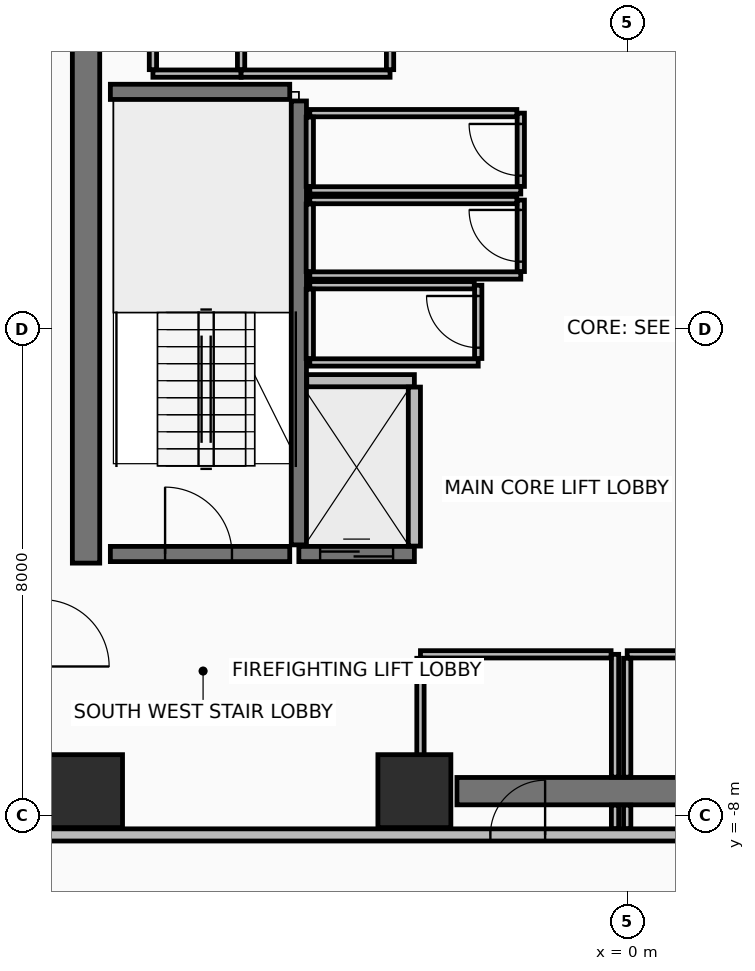
"""IFC4 building model, lengths in metres.
Left out: names, types, materials, properties, quantities, classifications, styles, units other than length and angle.
Written with IfcOpenShell. Run it as: python <this file> out.ifc"""

import sys

from ifc_helpers import new_model, si_unit, direction, frame, frame_2d, origin, origin_2d, place, context, subcontext, project, spatial, rectangle, extrude, element, fill, save


model = new_model("IFC4")
c1 = context("Model", 3, precision=1e-05, world=origin(), true_north=direction((0.0, 1.0)))
c2 = subcontext(c1, "Body", "Model", "MODEL_VIEW")
j1 = project(units=[si_unit("LENGTHUNIT", "METRE"), si_unit("PLANEANGLEUNIT", "RADIAN")], contexts=[c1])
p1 = place(None, origin())
s1 = spatial("IfcSite", under=j1, at=p1, CompositionType="ELEMENT")
p2 = place(p1, origin())
s2 = spatial("IfcBuilding", under=s1, at=p2, CompositionType="ELEMENT")
p3 = place(p2, frame((0.0, 0.0, 218.45)))
s3 = spatial("IfcBuildingStorey", under=s2, at=p3, CompositionType="ELEMENT", Elevation=218.45)
for number, where, z_axis, x_axis in (
    (1, (-8.9, -7.6, 0.0), (0.0, 0.0, 1.0), (1.0, 0.0, 0.0)),
    (2, (-3.5, -7.6, 0.0), (0.0, 0.0, 1.0), (1.0, 0.0, 0.0)),
):
    element("IfcColumn", number, at=place(p3, frame(where, z_axis=z_axis, x_axis=x_axis)), inside=s3, PredefinedType="COLUMN", context=c2, shape_type="SweptSolid", body=[
        extrude(rectangle(XDim=1.2, YDim=1.2, at=origin_2d()), origin(), (0.0, 0.0, 1.0), 3.6),
    ])
p4 = place(p3, frame((-2.8, -7.6, 0.0), z_axis=(0.0, 0.0, 1.0), x_axis=(1.0, 0.0, 0.0)))
e3 = element("IfcWall", 3, at=p4, inside=s3, PredefinedType="SHEAR", context=c2, shape_type="SweptSolid", body=[
    extrude(rectangle(XDim=5.38, YDim=0.45, at=frame_2d((2.69, 0.0))), origin(), (0.0, 0.0, 1.0), 3.36),
])
p5 = place(p3, frame((-8.9, -3.85, 0.0), z_axis=(0.0, 0.0, 1.0), x_axis=(0.0, 1.0, 0.0)))
e4 = element("IfcWall", 4, at=p5, inside=s3, PredefinedType="SHEAR", context=c2, shape_type="SweptSolid", body=[
    extrude(rectangle(XDim=10.7, YDim=0.45, at=frame_2d((5.35, 0.0))), origin(), (0.0, 0.0, 1.0), 3.36),
])
p6 = place(p3, frame((-9.62, -8.32, 0.0), z_axis=(0.0, 0.0, 1.0), x_axis=(1.0, 0.0, 0.0)))
e5 = element("IfcWall", 5, at=p6, inside=s3, PredefinedType="PARTITIONING", context=c2, shape_type="SweptSolid", body=[
    extrude(rectangle(XDim=19.24, YDim=0.2, at=frame_2d((9.62, 0.0))), origin(), (0.0, 0.0, 1.0), 2.805),
])
p7 = place(p6, frame((7.37, 0.0, 0.0)))
e6 = element("IfcOpeningElement", 6, at=p7, cuts=e5, PredefinedType="OPENING", context=c2, shape_type="SweptSolid", body=[
    extrude(rectangle(XDim=0.9, YDim=2.1, at=frame_2d((0.45, 1.05))), frame((0.0, 0.11, 0.0), z_axis=(0.0, -1.0, 0.0), x_axis=(1.0, 0.0, 0.0)), (0.0, 0.0, 1.0), 0.22),
])
p8 = place(p6, frame((10.77, 0.0, 0.0)))
e7 = element("IfcOpeningElement", 7, at=p8, cuts=e5, PredefinedType="OPENING", context=c2, shape_type="SweptSolid", body=[
    extrude(rectangle(XDim=0.9, YDim=2.1, at=frame_2d((0.45, 1.05))), frame((0.0, 0.11, 0.0), z_axis=(0.0, -1.0, 0.0), x_axis=(1.0, 0.0, 0.0)), (0.0, 0.0, 1.0), 0.22),
])
p9 = place(p6, frame((13.97, 0.0, 0.0)))
e8 = element("IfcOpeningElement", 8, at=p9, cuts=e5, PredefinedType="OPENING", context=c2, shape_type="SweptSolid", body=[
    extrude(rectangle(XDim=0.9, YDim=2.1, at=frame_2d((0.45, 1.05))), frame((0.0, 0.11, 0.0), z_axis=(0.0, -1.0, 0.0), x_axis=(1.0, 0.0, 0.0)), (0.0, 0.0, 1.0), 0.22),
])
p10 = place(p3, frame((-5.4, -3.55, 0.0), z_axis=(0.0, 0.0, 1.0), x_axis=(0.0, 1.0, 0.0)))
e9 = element("IfcWall", 9, at=p10, inside=s3, PredefinedType="SHEAR", context=c2, shape_type="SweptSolid", body=[
    extrude(rectangle(XDim=7.3, YDim=0.25, at=frame_2d((3.65, 0.0))), origin(), (0.0, 0.0, 1.0), 3.36),
])
p11 = place(p3, frame((-8.5, -3.7, 0.0), z_axis=(0.0, 0.0, 1.0), x_axis=(1.0, 0.0, 0.0)))
e10 = element("IfcWall", 10, at=p11, inside=s3, PredefinedType="SHEAR", context=c2, shape_type="SweptSolid", body=[
    extrude(rectangle(XDim=2.95, YDim=0.25, at=frame_2d((1.475, 0.0))), origin(), (0.0, 0.0, 1.0), 3.36),
])
p12 = place(p11, frame((0.9, 0.0, 0.0)))
e11 = element("IfcOpeningElement", 11, at=p12, cuts=e10, PredefinedType="OPENING", context=c2, shape_type="SweptSolid", body=[
    extrude(rectangle(XDim=1.1, YDim=2.15, at=frame_2d((0.55, 1.075))), frame((0.0, 0.135, 0.0), z_axis=(0.0, -1.0, 0.0), x_axis=(1.0, 0.0, 0.0)), (0.0, 0.0, 1.0), 0.27),
])
p13 = place(p3, frame((-8.5, 3.9, 0.0), z_axis=(0.0, 0.0, 1.0), x_axis=(1.0, 0.0, 0.0)))
e12 = element("IfcWall", 12, at=p13, inside=s3, PredefinedType="SHEAR", context=c2, shape_type="SweptSolid", body=[
    extrude(rectangle(XDim=2.95, YDim=0.25, at=frame_2d((1.475, 0.0))), origin(), (0.0, 0.0, 1.0), 3.36),
])
p14 = place(p3, frame((-5.4, -3.7, 0.0), z_axis=(0.0, 0.0, 1.0), x_axis=(1.0, 0.0, 0.0)))
e13 = element("IfcWall", 13, at=p14, inside=s3, PredefinedType="SHEAR", context=c2, shape_type="SweptSolid", body=[
    extrude(rectangle(XDim=1.9, YDim=0.25, at=frame_2d((0.95, 0.0))), origin(), (0.0, 0.0, 1.0), 3.36),
])
p15 = place(p14, frame((0.35, 0.0, 0.0)))
e14 = element("IfcOpeningElement", 14, at=p15, cuts=e13, PredefinedType="OPENING", context=c2, shape_type="SweptSolid", body=[
    extrude(rectangle(XDim=1.2, YDim=2.2, at=frame_2d((0.6, 1.1))), frame((0.0, 0.135, 0.0), z_axis=(0.0, -1.0, 0.0), x_axis=(1.0, 0.0, 0.0)), (0.0, 0.0, 1.0), 0.27),
])
p16 = place(p3, frame((-5.27, -0.85, 0.0), z_axis=(0.0, 0.0, 1.0), x_axis=(1.0, 0.0, 0.0)))
e15 = element("IfcWall", 15, at=p16, inside=s3, PredefinedType="PARTITIONING", context=c2, shape_type="SweptSolid", body=[
    extrude(rectangle(XDim=1.77, YDim=0.2, at=frame_2d((0.885, 0.0))), origin(), (0.0, 0.0, 1.0), 3.36),
])
p17 = place(p3, frame((-3.5, -3.57, 0.0), z_axis=(0.0, 0.0, 1.0), x_axis=(0.0, 1.0, 0.0)))
e16 = element("IfcWall", 16, at=p17, inside=s3, PredefinedType="PARTITIONING", context=c2, shape_type="SweptSolid", body=[
    extrude(rectangle(XDim=2.615, YDim=0.2, at=frame_2d((1.308, 0.0))), origin(), (0.0, 0.0, 1.0), 3.36),
])
p18 = place(p3, frame((-5.22, 2.28, 0.0), z_axis=(0.0, 0.0, 1.0), x_axis=(1.0, 0.0, 0.0)))
e17 = element("IfcWall", 17, at=p18, inside=s3, PredefinedType="PARTITIONING", context=c2, shape_type="SweptSolid", body=[
    extrude(rectangle(XDim=3.47, YDim=0.12, at=frame_2d((1.735, 0.0))), origin(), (0.0, 0.0, 1.0), 3.36),
])
p19 = place(p3, frame((-1.75, 2.345, 0.0), z_axis=(0.0, 0.0, 1.0), x_axis=(0.0, 1.0, 0.0)))
e18 = element("IfcWall", 18, at=p19, inside=s3, PredefinedType="PARTITIONING", context=c2, shape_type="SweptSolid", body=[
    extrude(rectangle(XDim=1.205, YDim=0.12, at=frame_2d((0.603, 0.0))), origin(), (0.0, 0.0, 1.0), 3.36),
])
p20 = place(p19, frame((0.177, 0.0, 0.0)))
e19 = element("IfcOpeningElement", 19, at=p20, cuts=e18, PredefinedType="OPENING", context=c2, shape_type="SweptSolid", body=[
    extrude(rectangle(XDim=0.85, YDim=2.1, at=frame_2d((0.425, 1.05))), frame((0.0, 0.07, 0.0), z_axis=(0.0, -1.0, 0.0), x_axis=(1.0, 0.0, 0.0)), (0.0, 0.0, 1.0), 0.14),
])
p21 = place(p3, frame((-1.815, 3.55, 0.0), z_axis=(0.0, 0.0, 1.0), x_axis=(-1.0, 0.0, 0.0)))
e20 = element("IfcWall", 20, at=p21, inside=s3, PredefinedType="PARTITIONING", context=c2, shape_type="SweptSolid", body=[
    extrude(rectangle(XDim=3.405, YDim=0.12, at=frame_2d((1.703, 0.0))), origin(), (0.0, 0.0, 1.0), 3.36),
])
p22 = place(p3, frame((-5.22, 3.485, 0.0), z_axis=(0.0, 0.0, 1.0), x_axis=(0.0, -1.0, 0.0)))
e21 = element("IfcWall", 21, at=p22, inside=s3, PredefinedType="PARTITIONING", context=c2, shape_type="SweptSolid", body=[
    extrude(rectangle(XDim=1.14, YDim=0.12, at=frame_2d((0.57, 0.0))), origin(), (0.0, 0.0, 1.0), 3.36),
])
p23 = place(p3, frame((-5.22, 0.88, 0.0), z_axis=(0.0, 0.0, 1.0), x_axis=(1.0, 0.0, 0.0)))
e22 = element("IfcWall", 22, at=p23, inside=s3, PredefinedType="PARTITIONING", context=c2, shape_type="SweptSolid", body=[
    extrude(rectangle(XDim=3.47, YDim=0.12, at=frame_2d((1.735, 0.0))), origin(), (0.0, 0.0, 1.0), 3.36),
])
p24 = place(p3, frame((-1.75, 0.945, 0.0), z_axis=(0.0, 0.0, 1.0), x_axis=(0.0, 1.0, 0.0)))
e23 = element("IfcWall", 23, at=p24, inside=s3, PredefinedType="PARTITIONING", context=c2, shape_type="SweptSolid", body=[
    extrude(rectangle(XDim=1.175, YDim=0.12, at=frame_2d((0.587, 0.0))), origin(), (0.0, 0.0, 1.0), 3.36),
])
p25 = place(p24, frame((0.163, 0.0, 0.0)))
e24 = element("IfcOpeningElement", 24, at=p25, cuts=e23, PredefinedType="OPENING", context=c2, shape_type="SweptSolid", body=[
    extrude(rectangle(XDim=0.85, YDim=2.1, at=frame_2d((0.425, 1.05))), frame((0.0, 0.07, 0.0), z_axis=(0.0, -1.0, 0.0), x_axis=(1.0, 0.0, 0.0)), (0.0, 0.0, 1.0), 0.14),
])
p26 = place(p3, frame((-1.815, 2.12, 0.0), z_axis=(0.0, 0.0, 1.0), x_axis=(-1.0, 0.0, 0.0)))
e25 = element("IfcWall", 25, at=p26, inside=s3, PredefinedType="PARTITIONING", context=c2, shape_type="SweptSolid", body=[
    extrude(rectangle(XDim=3.405, YDim=0.12, at=frame_2d((1.703, 0.0))), origin(), (0.0, 0.0, 1.0), 3.36),
])
p27 = place(p3, frame((-5.22, 2.055, 0.0), z_axis=(0.0, 0.0, 1.0), x_axis=(0.0, -1.0, 0.0)))
e26 = element("IfcWall", 26, at=p27, inside=s3, PredefinedType="PARTITIONING", context=c2, shape_type="SweptSolid", body=[
    extrude(rectangle(XDim=1.11, YDim=0.12, at=frame_2d((0.555, 0.0))), origin(), (0.0, 0.0, 1.0), 3.36),
])
p28 = place(p3, frame((-5.22, -0.55, 0.0), z_axis=(0.0, 0.0, 1.0), x_axis=(1.0, 0.0, 0.0)))
e27 = element("IfcWall", 27, at=p28, inside=s3, PredefinedType="PARTITIONING", context=c2, shape_type="SweptSolid", body=[
    extrude(rectangle(XDim=2.77, YDim=0.12, at=frame_2d((1.385, 0.0))), origin(), (0.0, 0.0, 1.0), 3.36),
])
p29 = place(p3, frame((-2.45, -0.485, 0.0), z_axis=(0.0, 0.0, 1.0), x_axis=(0.0, 1.0, 0.0)))
e28 = element("IfcWall", 28, at=p29, inside=s3, PredefinedType="PARTITIONING", context=c2, shape_type="SweptSolid", body=[
    extrude(rectangle(XDim=1.205, YDim=0.12, at=frame_2d((0.603, 0.0))), origin(), (0.0, 0.0, 1.0), 3.36),
])
p30 = place(p29, frame((0.178, 0.0, 0.0)))
e29 = element("IfcOpeningElement", 29, at=p30, cuts=e28, PredefinedType="OPENING", context=c2, shape_type="SweptSolid", body=[
    extrude(rectangle(XDim=0.85, YDim=2.1, at=frame_2d((0.425, 1.05))), frame((0.0, 0.07, 0.0), z_axis=(0.0, -1.0, 0.0), x_axis=(1.0, 0.0, 0.0)), (0.0, 0.0, 1.0), 0.14),
])
p31 = place(p3, frame((-2.515, 0.72, 0.0), z_axis=(0.0, 0.0, 1.0), x_axis=(-1.0, 0.0, 0.0)))
e30 = element("IfcWall", 30, at=p31, inside=s3, PredefinedType="PARTITIONING", context=c2, shape_type="SweptSolid", body=[
    extrude(rectangle(XDim=2.705, YDim=0.12, at=frame_2d((1.353, 0.0))), origin(), (0.0, 0.0, 1.0), 3.36),
])
p32 = place(p3, frame((-5.22, 0.655, 0.0), z_axis=(0.0, 0.0, 1.0), x_axis=(0.0, -1.0, 0.0)))
e31 = element("IfcWall", 31, at=p32, inside=s3, PredefinedType="PARTITIONING", context=c2, shape_type="SweptSolid", body=[
    extrude(rectangle(XDim=1.14, YDim=0.12, at=frame_2d((0.57, 0.0))), origin(), (0.0, 0.0, 1.0), 3.36),
])
p33 = place(p3, frame((-0.2, -8.215, 0.0), z_axis=(0.0, 0.0, 1.0), x_axis=(0.0, 1.0, 0.0)))
e32 = element("IfcWall", 32, at=p33, inside=s3, PredefinedType="PARTITIONING", context=c2, shape_type="SweptSolid", body=[
    extrude(rectangle(XDim=0.385, YDim=0.12, at=frame_2d((0.192, 0.0))), origin(), (0.0, 0.0, 1.0), 2.655),
])
p34 = place(p3, frame((-0.2, -7.37, 0.0), z_axis=(0.0, 0.0, 1.0), x_axis=(0.0, 1.0, 0.0)))
e33 = element("IfcWall", 33, at=p34, inside=s3, PredefinedType="PARTITIONING", context=c2, shape_type="SweptSolid", body=[
    extrude(rectangle(XDim=2.02, YDim=0.12, at=frame_2d((1.01, 0.0))), origin(), (0.0, 0.0, 1.0), 2.655),
])
p35 = place(p3, frame((-0.265, -5.35, 0.0), z_axis=(0.0, 0.0, 1.0), x_axis=(-1.0, 0.0, 0.0)))
e34 = element("IfcWall", 34, at=p35, inside=s3, PredefinedType="PARTITIONING", context=c2, shape_type="SweptSolid", body=[
    extrude(rectangle(XDim=3.135, YDim=0.12, at=frame_2d((1.567, 0.0))), origin(), (0.0, 0.0, 1.0), 2.655),
])
p36 = place(p3, frame((-3.4, -5.415, 0.0), z_axis=(0.0, 0.0, 1.0), x_axis=(0.0, -1.0, 0.0)))
e35 = element("IfcWall", 35, at=p36, inside=s3, PredefinedType="PARTITIONING", context=c2, shape_type="SweptSolid", body=[
    extrude(rectangle(XDim=2.8, YDim=0.12, at=frame_2d((1.4, 0.0))), origin(), (0.0, 0.0, 1.0), 2.655),
])
p37 = place(p3, frame((3.135, -5.35, 0.0), z_axis=(0.0, 0.0, 1.0), x_axis=(-1.0, 0.0, 0.0)))
e36 = element("IfcWall", 36, at=p37, inside=s3, PredefinedType="PARTITIONING", context=c2, shape_type="SweptSolid", body=[
    extrude(rectangle(XDim=3.135, YDim=0.12, at=frame_2d((1.567, 0.0))), origin(), (0.0, 0.0, 1.0), 3.36),
])
p38 = place(p3, frame((0.0, -5.415, 0.0), z_axis=(0.0, 0.0, 1.0), x_axis=(0.0, -1.0, 0.0)))
e37 = element("IfcWall", 37, at=p38, inside=s3, PredefinedType="PARTITIONING", context=c2, shape_type="SweptSolid", body=[
    extrude(rectangle(XDim=1.955, YDim=0.12, at=frame_2d((0.978, 0.0))), origin(), (0.0, 0.0, 1.0), 2.655),
])
p39 = place(p3, frame((0.0, -7.83, 0.0), z_axis=(0.0, 0.0, 1.0), x_axis=(0.0, -1.0, 0.0)))
e38 = element("IfcWall", 38, at=p39, inside=s3, PredefinedType="PARTITIONING", context=c2, shape_type="SweptSolid", body=[
    extrude(rectangle(XDim=0.385, YDim=0.12, at=frame_2d((0.192, 0.0))), origin(), (0.0, 0.0, 1.0), 2.655),
])
p40 = place(p3, frame((-7.8, 4.2, 0.0), z_axis=(0.0, 0.0, 1.0), x_axis=(1.0, 0.0, 0.0)))
e39 = element("IfcWall", 39, at=p40, inside=s3, PredefinedType="PARTITIONING", context=c2, shape_type="SweptSolid", body=[
    extrude(rectangle(XDim=1.45, YDim=0.12, at=frame_2d((0.725, 0.0))), origin(), (0.0, 0.0, 1.0), 3.36),
])
for number, where, z_axis, x_axis in (
    (40, (-6.35, 4.265, 0.0), (0.0, 0.0, 1.0), (0.0, 1.0, 0.0)),
    (41, (-7.8, 8.215, 0.0), (0.0, 0.0, 1.0), (0.0, -1.0, 0.0)),
):
    element("IfcWall", number, at=place(p3, frame(where, z_axis=z_axis, x_axis=x_axis)), inside=s3, PredefinedType="PARTITIONING", context=c2, shape_type="SweptSolid", body=[
        extrude(rectangle(XDim=3.95, YDim=0.12, at=frame_2d((1.975, 0.0))), origin(), (0.0, 0.0, 1.0), 2.655),
    ])
p41 = place(p3, frame((-6.35, 4.2, 0.0), z_axis=(0.0, 0.0, 1.0), x_axis=(1.0, 0.0, 0.0)))
e42 = element("IfcWall", 42, at=p41, inside=s3, PredefinedType="PARTITIONING", context=c2, shape_type="SweptSolid", body=[
    extrude(rectangle(XDim=2.45, YDim=0.12, at=frame_2d((1.225, 0.0))), origin(), (0.0, 0.0, 1.0), 3.36),
])
p42 = place(p3, frame((-3.9, 4.265, 0.0), z_axis=(0.0, 0.0, 1.0), x_axis=(0.0, 1.0, 0.0)))
e43 = element("IfcWall", 43, at=p42, inside=s3, PredefinedType="PARTITIONING", context=c2, shape_type="SweptSolid", body=[
    extrude(rectangle(XDim=3.95, YDim=0.12, at=frame_2d((1.975, 0.0))), origin(), (0.0, 0.0, 1.0), 2.655),
])
p43 = place(p3, frame((-8.564, -34.588, 0.0), z_axis=(0.0, 0.0, 1.0), x_axis=(-0.309019112765, 0.951055827986, 0.0)))
e44 = element("IfcWall", 44, at=p43, inside=s3, PredefinedType="PARTITIONING", context=c2, shape_type="SweptSolid", body=[
    extrude(rectangle(XDim=35.616, YDim=0.15, at=frame_2d((17.808, 0.0))), origin(), (0.0, 0.0, 1.0), 3.36),
])
p44 = place(p12, origin())
e45 = element("IfcDoor", 45, at=p44, inside=s3, OperationType="SINGLE_SWING_LEFT", PredefinedType="DOOR", context=c2, shape_type="SweptSolid", body=[
    extrude(rectangle(XDim=1.1, YDim=2.15, at=frame_2d((0.55, 1.075))), frame((0.0, 0.025, 0.0), z_axis=(0.0, -1.0, 0.0), x_axis=(1.0, 0.0, 0.0)), (0.0, 0.0, 1.0), 0.05),
])
fill(e11, e45)
p45 = place(p15, origin())
e46 = element("IfcDoor", 46, at=p45, inside=s3, OperationType="SLIDING_TO_RIGHT", PredefinedType="DOOR", context=c2, shape_type="SweptSolid", body=[
    extrude(rectangle(XDim=1.2, YDim=2.2, at=frame_2d((0.6, 1.1))), frame((0.0, 0.025, 0.0), z_axis=(0.0, -1.0, 0.0), x_axis=(1.0, 0.0, 0.0)), (0.0, 0.0, 1.0), 0.05),
])
fill(e14, e46)
p46 = place(p20, frame((0.85, 0.0, 0.0), z_axis=(0.0, 0.0, 1.0), x_axis=(-1.0, 0.0, 0.0)))
e47 = element("IfcDoor", 47, at=p46, inside=s3, OperationType="SINGLE_SWING_RIGHT", PredefinedType="DOOR", context=c2, shape_type="SweptSolid", body=[
    extrude(rectangle(XDim=0.85, YDim=2.1, at=frame_2d((0.425, 1.05))), frame((0.0, 0.025, 0.0), z_axis=(0.0, -1.0, 0.0), x_axis=(1.0, 0.0, 0.0)), (0.0, 0.0, 1.0), 0.05),
])
fill(e19, e47)
p47 = place(p25, frame((0.85, 0.0, 0.0), z_axis=(0.0, 0.0, 1.0), x_axis=(-1.0, 0.0, 0.0)))
e48 = element("IfcDoor", 48, at=p47, inside=s3, OperationType="SINGLE_SWING_RIGHT", PredefinedType="DOOR", context=c2, shape_type="SweptSolid", body=[
    extrude(rectangle(XDim=0.85, YDim=2.1, at=frame_2d((0.425, 1.05))), frame((0.0, 0.025, 0.0), z_axis=(0.0, -1.0, 0.0), x_axis=(1.0, 0.0, 0.0)), (0.0, 0.0, 1.0), 0.05),
])
fill(e24, e48)
p48 = place(p30, frame((0.85, 0.0, 0.0), z_axis=(0.0, 0.0, 1.0), x_axis=(-1.0, 0.0, 0.0)))
e49 = element("IfcDoor", 49, at=p48, inside=s3, OperationType="SINGLE_SWING_RIGHT", PredefinedType="DOOR", context=c2, shape_type="SweptSolid", body=[
    extrude(rectangle(XDim=0.85, YDim=2.1, at=frame_2d((0.425, 1.05))), frame((0.0, 0.025, 0.0), z_axis=(0.0, -1.0, 0.0), x_axis=(1.0, 0.0, 0.0)), (0.0, 0.0, 1.0), 0.05),
])
fill(e29, e49)
p49 = place(p7, frame((0.9, 0.0, 0.0), z_axis=(0.0, 0.0, 1.0), x_axis=(-1.0, 0.0, 0.0)))
e50 = element("IfcDoor", 50, at=p49, inside=s3, OperationType="SINGLE_SWING_LEFT", PredefinedType="DOOR", context=c2, shape_type="SweptSolid", body=[
    extrude(rectangle(XDim=0.9, YDim=2.1, at=frame_2d((0.45, 1.05))), frame((0.0, 0.025, 0.0), z_axis=(0.0, -1.0, 0.0), x_axis=(1.0, 0.0, 0.0)), (0.0, 0.0, 1.0), 0.05),
])
fill(e6, e50)
save(model, sys.argv[1])
